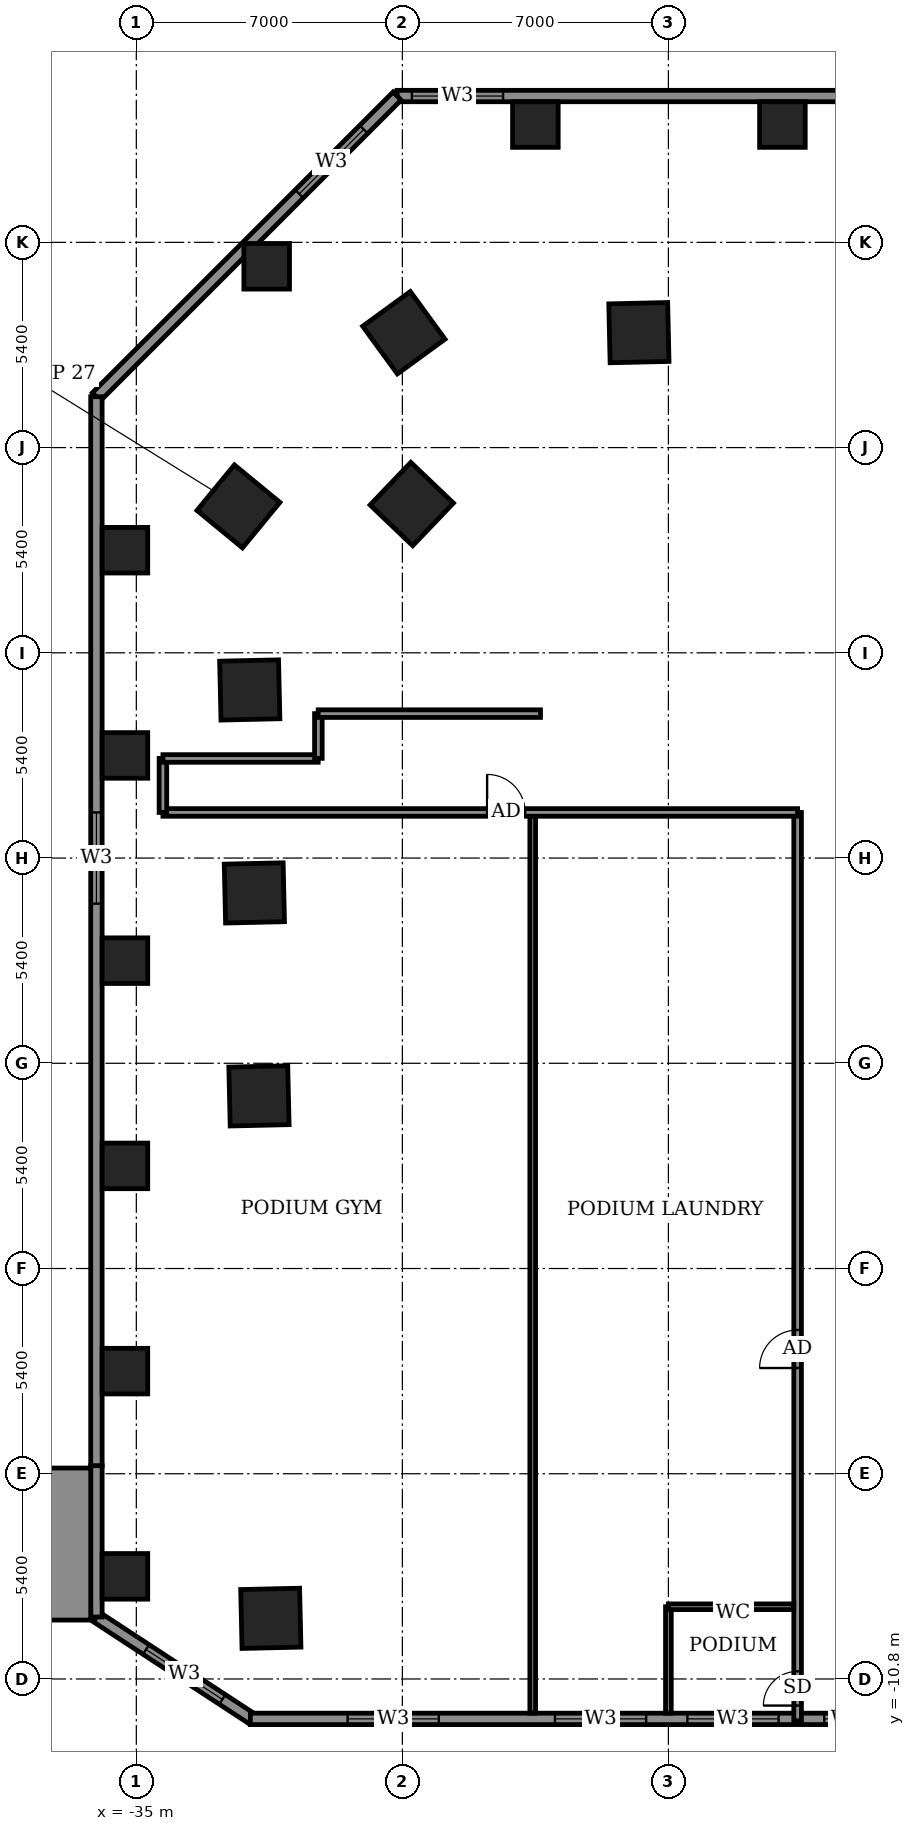
"""IFC4 building model, lengths in metres.
Left out: names, types, materials, properties, quantities, classifications, styles, units other than length and angle.
Written with IfcOpenShell. Run it as: python <this file> out.ifc"""

import sys

from ifc_helpers import new_model, si_unit, direction, frame, frame_2d, origin, origin_2d, place, context, subcontext, project, spatial, rectangle, extrude, element, fill, save


model = new_model("IFC4")
c1 = context("Model", 3, precision=1e-05, world=origin(), true_north=direction((0.0, 1.0)))
c2 = subcontext(c1, "Body", "Model", "MODEL_VIEW")
j1 = project(units=[si_unit("LENGTHUNIT", "METRE"), si_unit("PLANEANGLEUNIT", "RADIAN")], contexts=[c1])
p1 = place(None, origin())
s1 = spatial("IfcSite", under=j1, at=p1, CompositionType="ELEMENT")
p2 = place(p1, origin())
s2 = spatial("IfcBuilding", under=s1, at=p2, CompositionType="ELEMENT")
p3 = place(p2, frame((0.0, 0.0, 16.0)))
s3 = spatial("IfcBuildingStorey", under=s2, at=p3, CompositionType="ELEMENT", Elevation=16.0)
for number, where, z_axis, x_axis in (
    (1, (-31.461, -9.204, -0.55), (0.0, 0.0, 1.0), (0.023, -1.0, 0.0)),
    (2, (-21.776, 24.624, -0.55), (0.0, 0.0, 1.0), (-1.0, -0.023, 0.0)),
    (3, (-27.961, 24.623, -0.55), (0.0, 0.0, 1.0), (-0.808, -0.589, 0.0)),
    (4, (-27.753, 20.115, -0.55), (0.0, 0.0, 1.0), (-0.691, -0.723, 0.0)),
    (5, (-32.313, 20.053, -0.55), (0.0, 0.0, 1.0), (-0.635, -0.772, 0.0)),
    (6, (-32.015, 15.223, -0.55), (0.0, 0.0, 1.0), (0.023, -1.0, 0.0)),
    (7, (-31.894, 9.883, -0.55), (0.0, 0.0, 1.0), (0.023, -1.0, 0.0)),
    (8, (-31.773, 4.542, -0.55), (0.0, 0.0, 1.0), (0.023, -1.0, 0.0)),
):
    element("IfcColumn", number, at=place(p3, frame(where, z_axis=z_axis, x_axis=x_axis)), inside=s3, PredefinedType="COLUMN", context=c2, shape_type="SweptSolid", body=[
        extrude(rectangle(XDim=1.55, YDim=1.55, at=origin_2d()), origin(), (0.0, 0.0, 1.0), 4.5),
    ])
for number, where, z_axis, x_axis in (
    (9, (-24.5, 30.1, -0.55), (0.0, 0.0, 1.0), (1.0, 0.0, 0.0)),
    (10, (-18.0, 30.1, -0.55), (0.0, 0.0, 1.0), (1.0, 0.0, 0.0)),
    (11, (-35.3, -8.1, -0.55), (0.0, 0.0, 1.0), (1.0, 0.0, 0.0)),
    (12, (-35.3, -2.7, -0.55), (0.0, 0.0, 1.0), (1.0, 0.0, 0.0)),
    (13, (-35.3, 2.7, -0.55), (0.0, 0.0, 1.0), (1.0, 0.0, 0.0)),
    (14, (-35.3, 8.1, -0.55), (0.0, 0.0, 1.0), (1.0, 0.0, 0.0)),
    (15, (-35.3, 13.5, -0.55), (0.0, 0.0, 1.0), (1.0, 0.0, 0.0)),
    (16, (-35.3, 18.9, -0.55), (0.0, 0.0, 1.0), (1.0, 0.0, 0.0)),
    (17, (-31.57, 26.37, -0.55), (0.0, 0.0, 1.0), (1.0, 0.0, 0.0)),
):
    element("IfcColumn", number, at=place(p3, frame(where, z_axis=z_axis, x_axis=x_axis)), inside=s3, PredefinedType="COLUMN", context=c2, shape_type="SweptSolid", body=[
        extrude(rectangle(XDim=1.2, YDim=1.2, at=origin_2d()), origin(), (0.0, 0.0, 1.0), 4.5),
    ])
p4 = place(p3, frame((-36.05, -9.169, 0.0), z_axis=(0.0, 0.0, 1.0), x_axis=(0.836625876117, -0.54777471958, 0.0)))
e18 = element("IfcWall", 18, at=p4, inside=s3, PredefinedType="SOLIDWALL", context=c2, shape_type="SweptSolid", body=[
    extrude(rectangle(XDim=4.895, YDim=0.3, at=frame_2d((2.447, 0.0))), origin(), (0.0, 0.0, 1.0), 3.95),
])
p5 = place(p4, frame((1.561, 0.0, 0.9)))
e19 = element("IfcOpeningElement", 19, at=p5, cuts=e18, PredefinedType="OPENING", context=c2, shape_type="SweptSolid", body=[
    extrude(rectangle(XDim=2.4, YDim=1.8, at=frame_2d((1.2, 0.9))), frame((0.0, 0.16, 0.0), z_axis=(0.0, -1.0, 0.0), x_axis=(1.0, 0.0, 0.0)), (0.0, 0.0, 1.0), 0.32),
])
p6 = place(p3, frame((-32.0, -11.85, 0.0), z_axis=(0.0, 0.0, 1.0), x_axis=(1.0, 0.0, 0.0)))
e20 = element("IfcWall", 20, at=p6, inside=s3, PredefinedType="SOLIDWALL", context=c2, shape_type="SweptSolid", body=[
    extrude(rectangle(XDim=17.0, YDim=0.3, at=frame_2d((8.5, 0.0))), origin(), (0.0, 0.0, 1.0), 3.95),
])
p7 = place(p6, frame((2.559, 0.0, 0.9)))
e21 = element("IfcOpeningElement", 21, at=p7, cuts=e20, PredefinedType="OPENING", context=c2, shape_type="SweptSolid", body=[
    extrude(rectangle(XDim=2.4, YDim=1.8, at=frame_2d((1.2, 0.9))), frame((0.0, 0.16, 0.0), z_axis=(0.0, -1.0, 0.0), x_axis=(1.0, 0.0, 0.0)), (0.0, 0.0, 1.0), 0.32),
])
p8 = place(p6, frame((8.015, 0.0, 0.9)))
e22 = element("IfcOpeningElement", 22, at=p8, cuts=e20, PredefinedType="OPENING", context=c2, shape_type="SweptSolid", body=[
    extrude(rectangle(XDim=2.4, YDim=1.8, at=frame_2d((1.2, 0.9))), frame((0.0, 0.16, 0.0), z_axis=(0.0, -1.0, 0.0), x_axis=(1.0, 0.0, 0.0)), (0.0, 0.0, 1.0), 0.32),
])
p9 = place(p6, frame((11.5, 0.0, 0.9)))
e23 = element("IfcOpeningElement", 23, at=p9, cuts=e20, PredefinedType="OPENING", context=c2, shape_type="SweptSolid", body=[
    extrude(rectangle(XDim=2.4, YDim=1.8, at=frame_2d((1.2, 0.9))), frame((0.0, 0.16, 0.0), z_axis=(0.0, -1.0, 0.0), x_axis=(1.0, 0.0, 0.0)), (0.0, 0.0, 1.0), 0.32),
])
p10 = place(p6, frame((15.1, 0.0, 0.9)))
e24 = element("IfcOpeningElement", 24, at=p10, cuts=e20, PredefinedType="OPENING", context=c2, shape_type="SweptSolid", body=[
    extrude(rectangle(XDim=1.2, YDim=1.5, at=frame_2d((0.6, 0.75))), frame((0.0, 0.16, 0.0), z_axis=(0.0, -1.0, 0.0), x_axis=(1.0, 0.0, 0.0)), (0.0, 0.0, 1.0), 0.32),
])
p11 = place(p3, frame((28.138, 30.85, 0.0), z_axis=(0.0, 0.0, 1.0), x_axis=(-1.0, 0.0, 0.0)))
e25 = element("IfcWall", 25, at=p11, inside=s3, PredefinedType="SOLIDWALL", context=c2, shape_type="SweptSolid", body=[
    extrude(rectangle(XDim=56.276, YDim=0.3, at=frame_2d((28.138, 0.0))), origin(), (0.0, 0.0, 1.0), 3.95),
])
p12 = place(p11, frame((5.688, 0.0, 0.9)))
e26 = element("IfcOpeningElement", 26, at=p12, cuts=e25, PredefinedType="OPENING", context=c2, shape_type="SweptSolid", body=[
    extrude(rectangle(XDim=2.4, YDim=1.8, at=frame_2d((1.2, 0.9))), frame((0.0, 0.16, 0.0), z_axis=(0.0, -1.0, 0.0), x_axis=(1.0, 0.0, 0.0)), (0.0, 0.0, 1.0), 0.32),
])
p13 = place(p11, frame((18.638, 0.0, 0.9)))
e27 = element("IfcOpeningElement", 27, at=p13, cuts=e25, PredefinedType="OPENING", context=c2, shape_type="SweptSolid", body=[
    extrude(rectangle(XDim=2.4, YDim=1.8, at=frame_2d((1.2, 0.9))), frame((0.0, 0.16, 0.0), z_axis=(0.0, -1.0, 0.0), x_axis=(1.0, 0.0, 0.0)), (0.0, 0.0, 1.0), 0.32),
])
p14 = place(p11, frame((26.178, 0.0, 0.9)))
e28 = element("IfcOpeningElement", 28, at=p14, cuts=e25, PredefinedType="OPENING", context=c2, shape_type="SweptSolid", body=[
    extrude(rectangle(XDim=2.4, YDim=1.8, at=frame_2d((1.2, 0.9))), frame((0.0, 0.16, 0.0), z_axis=(0.0, -1.0, 0.0), x_axis=(1.0, 0.0, 0.0)), (0.0, 0.0, 1.0), 0.32),
])
p15 = place(p11, frame((32.883, 0.0, 0.9)))
e29 = element("IfcOpeningElement", 29, at=p15, cuts=e25, PredefinedType="OPENING", context=c2, shape_type="SweptSolid", body=[
    extrude(rectangle(XDim=2.4, YDim=1.8, at=frame_2d((1.2, 0.9))), frame((0.0, 0.16, 0.0), z_axis=(0.0, -1.0, 0.0), x_axis=(1.0, 0.0, 0.0)), (0.0, 0.0, 1.0), 0.32),
])
p16 = place(p11, frame((40.263, 0.0, 0.9)))
e30 = element("IfcOpeningElement", 30, at=p16, cuts=e25, PredefinedType="OPENING", context=c2, shape_type="SweptSolid", body=[
    extrude(rectangle(XDim=2.4, YDim=1.8, at=frame_2d((1.2, 0.9))), frame((0.0, 0.16, 0.0), z_axis=(0.0, -1.0, 0.0), x_axis=(1.0, 0.0, 0.0)), (0.0, 0.0, 1.0), 0.32),
])
p17 = place(p11, frame((53.488, 0.0, 0.9)))
e31 = element("IfcOpeningElement", 31, at=p17, cuts=e25, PredefinedType="OPENING", context=c2, shape_type="SweptSolid", body=[
    extrude(rectangle(XDim=2.4, YDim=1.8, at=frame_2d((1.2, 0.9))), frame((0.0, 0.16, 0.0), z_axis=(0.0, -1.0, 0.0), x_axis=(1.0, 0.0, 0.0)), (0.0, 0.0, 1.0), 0.32),
])
p18 = place(p3, frame((-28.138, 30.85, 0.0), z_axis=(0.0, 0.0, 1.0), x_axis=(-0.707106781187, -0.707106781187, 0.0)))
e32 = element("IfcWall", 32, at=p18, inside=s3, PredefinedType="SOLIDWALL", context=c2, shape_type="SweptSolid", body=[
    extrude(rectangle(XDim=11.189, YDim=0.3, at=frame_2d((5.595, 0.0))), origin(), (0.0, 0.0, 1.0), 3.95),
])
p19 = place(p18, frame((1.242, 0.0, 0.9)))
e33 = element("IfcOpeningElement", 33, at=p19, cuts=e32, PredefinedType="OPENING", context=c2, shape_type="SweptSolid", body=[
    extrude(rectangle(XDim=2.4, YDim=1.8, at=frame_2d((1.2, 0.9))), frame((0.0, 0.16, 0.0), z_axis=(0.0, -1.0, 0.0), x_axis=(1.0, 0.0, 0.0)), (0.0, 0.0, 1.0), 0.32),
])
p20 = place(p3, frame((-36.05, -5.187, 0.0), z_axis=(0.0, 0.0, 1.0), x_axis=(0.0, -1.0, 0.0)))
e34 = element("IfcWall", 34, at=p20, inside=s3, PredefinedType="SOLIDWALL", context=c2, shape_type="SweptSolid", body=[
    extrude(rectangle(XDim=3.982, YDim=0.3, at=frame_2d((1.991, 0.0))), origin(), (0.0, 0.0, 1.0), 3.95),
])
p21 = place(p3, frame((-36.05, 22.938, 0.0), z_axis=(0.0, 0.0, 1.0), x_axis=(0.0, -1.0, 0.0)))
e35 = element("IfcWall", 35, at=p21, inside=s3, PredefinedType="SOLIDWALL", context=c2, shape_type="SweptSolid", body=[
    extrude(rectangle(XDim=28.125, YDim=0.3, at=frame_2d((14.062, 0.0))), origin(), (0.0, 0.0, 1.0), 3.95),
])
p22 = place(p21, frame((10.938, 0.0, 0.9)))
e36 = element("IfcOpeningElement", 36, at=p22, cuts=e35, PredefinedType="OPENING", context=c2, shape_type="SweptSolid", body=[
    extrude(rectangle(XDim=2.4, YDim=1.8, at=frame_2d((1.2, 0.9))), frame((0.0, 0.16, 0.0), z_axis=(0.0, -1.0, 0.0), x_axis=(1.0, 0.0, 0.0)), (0.0, 0.0, 1.0), 0.32),
])
p23 = place(p3, frame((-37.45, -9.25, 0.0), z_axis=(0.0, 0.0, 1.0), x_axis=(0.0, 1.0, 0.0)))
e37 = element("IfcWall", 37, at=p23, inside=s3, PredefinedType="STANDARD", context=c2, shape_type="SweptSolid", body=[
    extrude(rectangle(XDim=4.0, YDim=2.5, at=frame_2d((2.0, 0.0))), origin(), (0.0, 0.0, 1.0), 4.5),
])
p24 = place(p3, frame((-24.57, -11.7, 0.0), z_axis=(0.0, 0.0, 1.0), x_axis=(0.0, 1.0, 0.0)))
e38 = element("IfcWall", 38, at=p24, inside=s3, PredefinedType="PARTITIONING", context=c2, shape_type="SweptSolid", body=[
    extrude(rectangle(XDim=23.6, YDim=0.15, at=frame_2d((11.8, 0.0))), origin(), (0.0, 0.0, 1.0), 3.95),
])
p25 = place(p3, frame((-21.0, -11.7, 0.0), z_axis=(0.0, 0.0, 1.0), x_axis=(0.0, 1.0, 0.0)))
e39 = element("IfcWall", 39, at=p25, inside=s3, PredefinedType="PARTITIONING", context=c2, shape_type="SweptSolid", body=[
    extrude(rectangle(XDim=2.8, YDim=0.15, at=frame_2d((1.4, 0.0))), origin(), (0.0, 0.0, 1.0), 3.95),
])
p26 = place(p3, frame((-17.6, -11.9, 0.0), z_axis=(0.0, 0.0, 1.0), x_axis=(0.0, 1.0, 0.0)))
e40 = element("IfcWall", 40, at=p26, inside=s3, PredefinedType="PARTITIONING", context=c2, shape_type="SweptSolid", body=[
    extrude(rectangle(XDim=23.9, YDim=0.2, at=frame_2d((11.95, 0.0))), origin(), (0.0, 0.0, 1.0), 3.95),
])
p27 = place(p26, frame((9.282, 0.0, 0.0)))
e41 = element("IfcOpeningElement", 41, at=p27, cuts=e40, PredefinedType="OPENING", context=c2, shape_type="SweptSolid", body=[
    extrude(rectangle(XDim=1.0, YDim=2.1, at=frame_2d((0.5, 1.05))), frame((0.0, 0.11, 0.0), z_axis=(0.0, -1.0, 0.0), x_axis=(1.0, 0.0, 0.0)), (0.0, 0.0, 1.0), 0.22),
])
p28 = place(p26, frame((0.4, 0.0, 0.0)))
e42 = element("IfcOpeningElement", 42, at=p28, cuts=e40, PredefinedType="OPENING", context=c2, shape_type="SweptSolid", body=[
    extrude(rectangle(XDim=0.9, YDim=2.1, at=frame_2d((0.45, 1.05))), frame((0.0, 0.11, 0.0), z_axis=(0.0, -1.0, 0.0), x_axis=(1.0, 0.0, 0.0)), (0.0, 0.0, 1.0), 0.22),
])
p29 = place(p3, frame((-21.0, -8.9, 0.0), z_axis=(0.0, 0.0, 1.0), x_axis=(1.0, 0.0, 0.0)))
e43 = element("IfcWall", 43, at=p29, inside=s3, PredefinedType="PARTITIONING", context=c2, shape_type="SweptSolid", body=[
    extrude(rectangle(XDim=3.3, YDim=0.15, at=frame_2d((1.65, 0.0))), origin(), (0.0, 0.0, 1.0), 3.95),
])
p30 = place(p3, frame((-34.3, 12.0, 0.0), z_axis=(0.0, 0.0, 1.0), x_axis=(1.0, 0.0, 0.0)))
e44 = element("IfcWall", 44, at=p30, inside=s3, PredefinedType="PARTITIONING", context=c2, shape_type="SweptSolid", body=[
    extrude(rectangle(XDim=16.7, YDim=0.2, at=frame_2d((8.35, 0.0))), origin(), (0.0, 0.0, 1.0), 3.95),
])
p31 = place(p30, frame((8.53, 0.0, 0.0)))
e45 = element("IfcOpeningElement", 45, at=p31, cuts=e44, PredefinedType="OPENING", context=c2, shape_type="SweptSolid", body=[
    extrude(rectangle(XDim=1.0, YDim=2.1, at=frame_2d((0.5, 1.05))), frame((0.0, 0.11, 0.0), z_axis=(0.0, -1.0, 0.0), x_axis=(1.0, 0.0, 0.0)), (0.0, 0.0, 1.0), 0.22),
])
p32 = place(p3, frame((-34.3, 12.0, 0.0), z_axis=(0.0, 0.0, 1.0), x_axis=(0.0, 1.0, 0.0)))
e46 = element("IfcWall", 46, at=p32, inside=s3, PredefinedType="PARTITIONING", context=c2, shape_type="SweptSolid", body=[
    extrude(rectangle(XDim=1.423, YDim=0.2, at=frame_2d((0.711, 0.0))), origin(), (0.0, 0.0, 1.0), 3.95),
])
p33 = place(p3, frame((-34.3, 13.42, 0.0), z_axis=(0.0, 0.0, 1.0), x_axis=(1.0, 0.0, 0.0)))
e47 = element("IfcWall", 47, at=p33, inside=s3, PredefinedType="PARTITIONING", context=c2, shape_type="SweptSolid", body=[
    extrude(rectangle(XDim=4.085, YDim=0.2, at=frame_2d((2.042, 0.0))), origin(), (0.0, 0.0, 1.0), 3.95),
])
p34 = place(p3, frame((-30.21, 13.423, 0.0), z_axis=(0.0, 0.0, 1.0), x_axis=(0.0, 1.0, 0.0)))
e48 = element("IfcWall", 48, at=p34, inside=s3, PredefinedType="PARTITIONING", context=c2, shape_type="SweptSolid", body=[
    extrude(rectangle(XDim=1.177, YDim=0.2, at=frame_2d((0.588, 0.0))), origin(), (0.0, 0.0, 1.0), 3.95),
])
p35 = place(p3, frame((-30.215, 14.6, 0.0), z_axis=(0.0, 0.0, 1.0), x_axis=(1.0, 0.0, 0.0)))
e49 = element("IfcWall", 49, at=p35, inside=s3, PredefinedType="PARTITIONING", context=c2, shape_type="SweptSolid", body=[
    extrude(rectangle(XDim=5.849, YDim=0.2, at=frame_2d((2.925, 0.0))), origin(), (0.0, 0.0, 1.0), 3.95),
])
p36 = place(p5, origin())
e50 = element("IfcWindow", 50, at=p36, inside=s3, PartitioningType="DOUBLE_PANEL_VERTICAL", PredefinedType="WINDOW", context=c2, shape_type="SweptSolid", body=[
    extrude(rectangle(XDim=2.4, YDim=1.8, at=frame_2d((1.2, 0.9))), frame((0.0, 0.03, 0.0), z_axis=(0.0, -1.0, 0.0), x_axis=(1.0, 0.0, 0.0)), (0.0, 0.0, 1.0), 0.06),
])
fill(e19, e50)
p37 = place(p7, origin())
e51 = element("IfcWindow", 51, at=p37, inside=s3, PartitioningType="DOUBLE_PANEL_VERTICAL", PredefinedType="WINDOW", context=c2, shape_type="SweptSolid", body=[
    extrude(rectangle(XDim=2.4, YDim=1.8, at=frame_2d((1.2, 0.9))), frame((0.0, 0.03, 0.0), z_axis=(0.0, -1.0, 0.0), x_axis=(1.0, 0.0, 0.0)), (0.0, 0.0, 1.0), 0.06),
])
fill(e21, e51)
p38 = place(p8, origin())
e52 = element("IfcWindow", 52, at=p38, inside=s3, PartitioningType="DOUBLE_PANEL_VERTICAL", PredefinedType="WINDOW", context=c2, shape_type="SweptSolid", body=[
    extrude(rectangle(XDim=2.4, YDim=1.8, at=frame_2d((1.2, 0.9))), frame((0.0, 0.03, 0.0), z_axis=(0.0, -1.0, 0.0), x_axis=(1.0, 0.0, 0.0)), (0.0, 0.0, 1.0), 0.06),
])
fill(e22, e52)
p39 = place(p9, origin())
e53 = element("IfcWindow", 53, at=p39, inside=s3, PartitioningType="DOUBLE_PANEL_VERTICAL", PredefinedType="WINDOW", context=c2, shape_type="SweptSolid", body=[
    extrude(rectangle(XDim=2.4, YDim=1.8, at=frame_2d((1.2, 0.9))), frame((0.0, 0.03, 0.0), z_axis=(0.0, -1.0, 0.0), x_axis=(1.0, 0.0, 0.0)), (0.0, 0.0, 1.0), 0.06),
])
fill(e23, e53)
p40 = place(p10, origin())
e54 = element("IfcWindow", 54, at=p40, inside=s3, PartitioningType="SINGLE_PANEL", PredefinedType="WINDOW", context=c2, shape_type="SweptSolid", body=[
    extrude(rectangle(XDim=1.2, YDim=1.5, at=frame_2d((0.6, 0.75))), frame((0.0, 0.03, 0.0), z_axis=(0.0, -1.0, 0.0), x_axis=(1.0, 0.0, 0.0)), (0.0, 0.0, 1.0), 0.06),
])
fill(e24, e54)
p41 = place(p17, origin())
e55 = element("IfcWindow", 55, at=p41, inside=s3, PartitioningType="DOUBLE_PANEL_VERTICAL", PredefinedType="WINDOW", context=c2, shape_type="SweptSolid", body=[
    extrude(rectangle(XDim=2.4, YDim=1.8, at=frame_2d((1.2, 0.9))), frame((0.0, 0.03, 0.0), z_axis=(0.0, -1.0, 0.0), x_axis=(1.0, 0.0, 0.0)), (0.0, 0.0, 1.0), 0.06),
])
fill(e31, e55)
p42 = place(p19, origin())
e56 = element("IfcWindow", 56, at=p42, inside=s3, PartitioningType="DOUBLE_PANEL_VERTICAL", PredefinedType="WINDOW", context=c2, shape_type="SweptSolid", body=[
    extrude(rectangle(XDim=2.4, YDim=1.8, at=frame_2d((1.2, 0.9))), frame((0.0, 0.03, 0.0), z_axis=(0.0, -1.0, 0.0), x_axis=(1.0, 0.0, 0.0)), (0.0, 0.0, 1.0), 0.06),
])
fill(e33, e56)
p43 = place(p22, origin())
e57 = element("IfcWindow", 57, at=p43, inside=s3, PartitioningType="DOUBLE_PANEL_VERTICAL", PredefinedType="WINDOW", context=c2, shape_type="SweptSolid", body=[
    extrude(rectangle(XDim=2.4, YDim=1.8, at=frame_2d((1.2, 0.9))), frame((0.0, 0.03, 0.0), z_axis=(0.0, -1.0, 0.0), x_axis=(1.0, 0.0, 0.0)), (0.0, 0.0, 1.0), 0.06),
])
fill(e36, e57)
p44 = place(p27, origin())
e58 = element("IfcDoor", 58, at=p44, inside=s3, OperationType="SINGLE_SWING_LEFT", PredefinedType="DOOR", context=c2, shape_type="SweptSolid", body=[
    extrude(rectangle(XDim=1.0, YDim=2.1, at=frame_2d((0.5, 1.05))), frame((0.0, 0.025, 0.0), z_axis=(0.0, -1.0, 0.0), x_axis=(1.0, 0.0, 0.0)), (0.0, 0.0, 1.0), 0.05),
])
fill(e41, e58)
p45 = place(p28, origin())
e59 = element("IfcDoor", 59, at=p45, inside=s3, OperationType="SINGLE_SWING_LEFT", PredefinedType="DOOR", context=c2, shape_type="SweptSolid", body=[
    extrude(rectangle(XDim=0.9, YDim=2.1, at=frame_2d((0.45, 1.05))), frame((0.0, 0.025, 0.0), z_axis=(0.0, -1.0, 0.0), x_axis=(1.0, 0.0, 0.0)), (0.0, 0.0, 1.0), 0.05),
])
fill(e42, e59)
p46 = place(p31, origin())
e60 = element("IfcDoor", 60, at=p46, inside=s3, OperationType="SINGLE_SWING_RIGHT", PredefinedType="DOOR", context=c2, shape_type="SweptSolid", body=[
    extrude(rectangle(XDim=1.0, YDim=2.1, at=frame_2d((0.5, 1.05))), frame((0.0, 0.025, 0.0), z_axis=(0.0, -1.0, 0.0), x_axis=(1.0, 0.0, 0.0)), (0.0, 0.0, 1.0), 0.05),
])
fill(e45, e60)
save(model, sys.argv[1])
